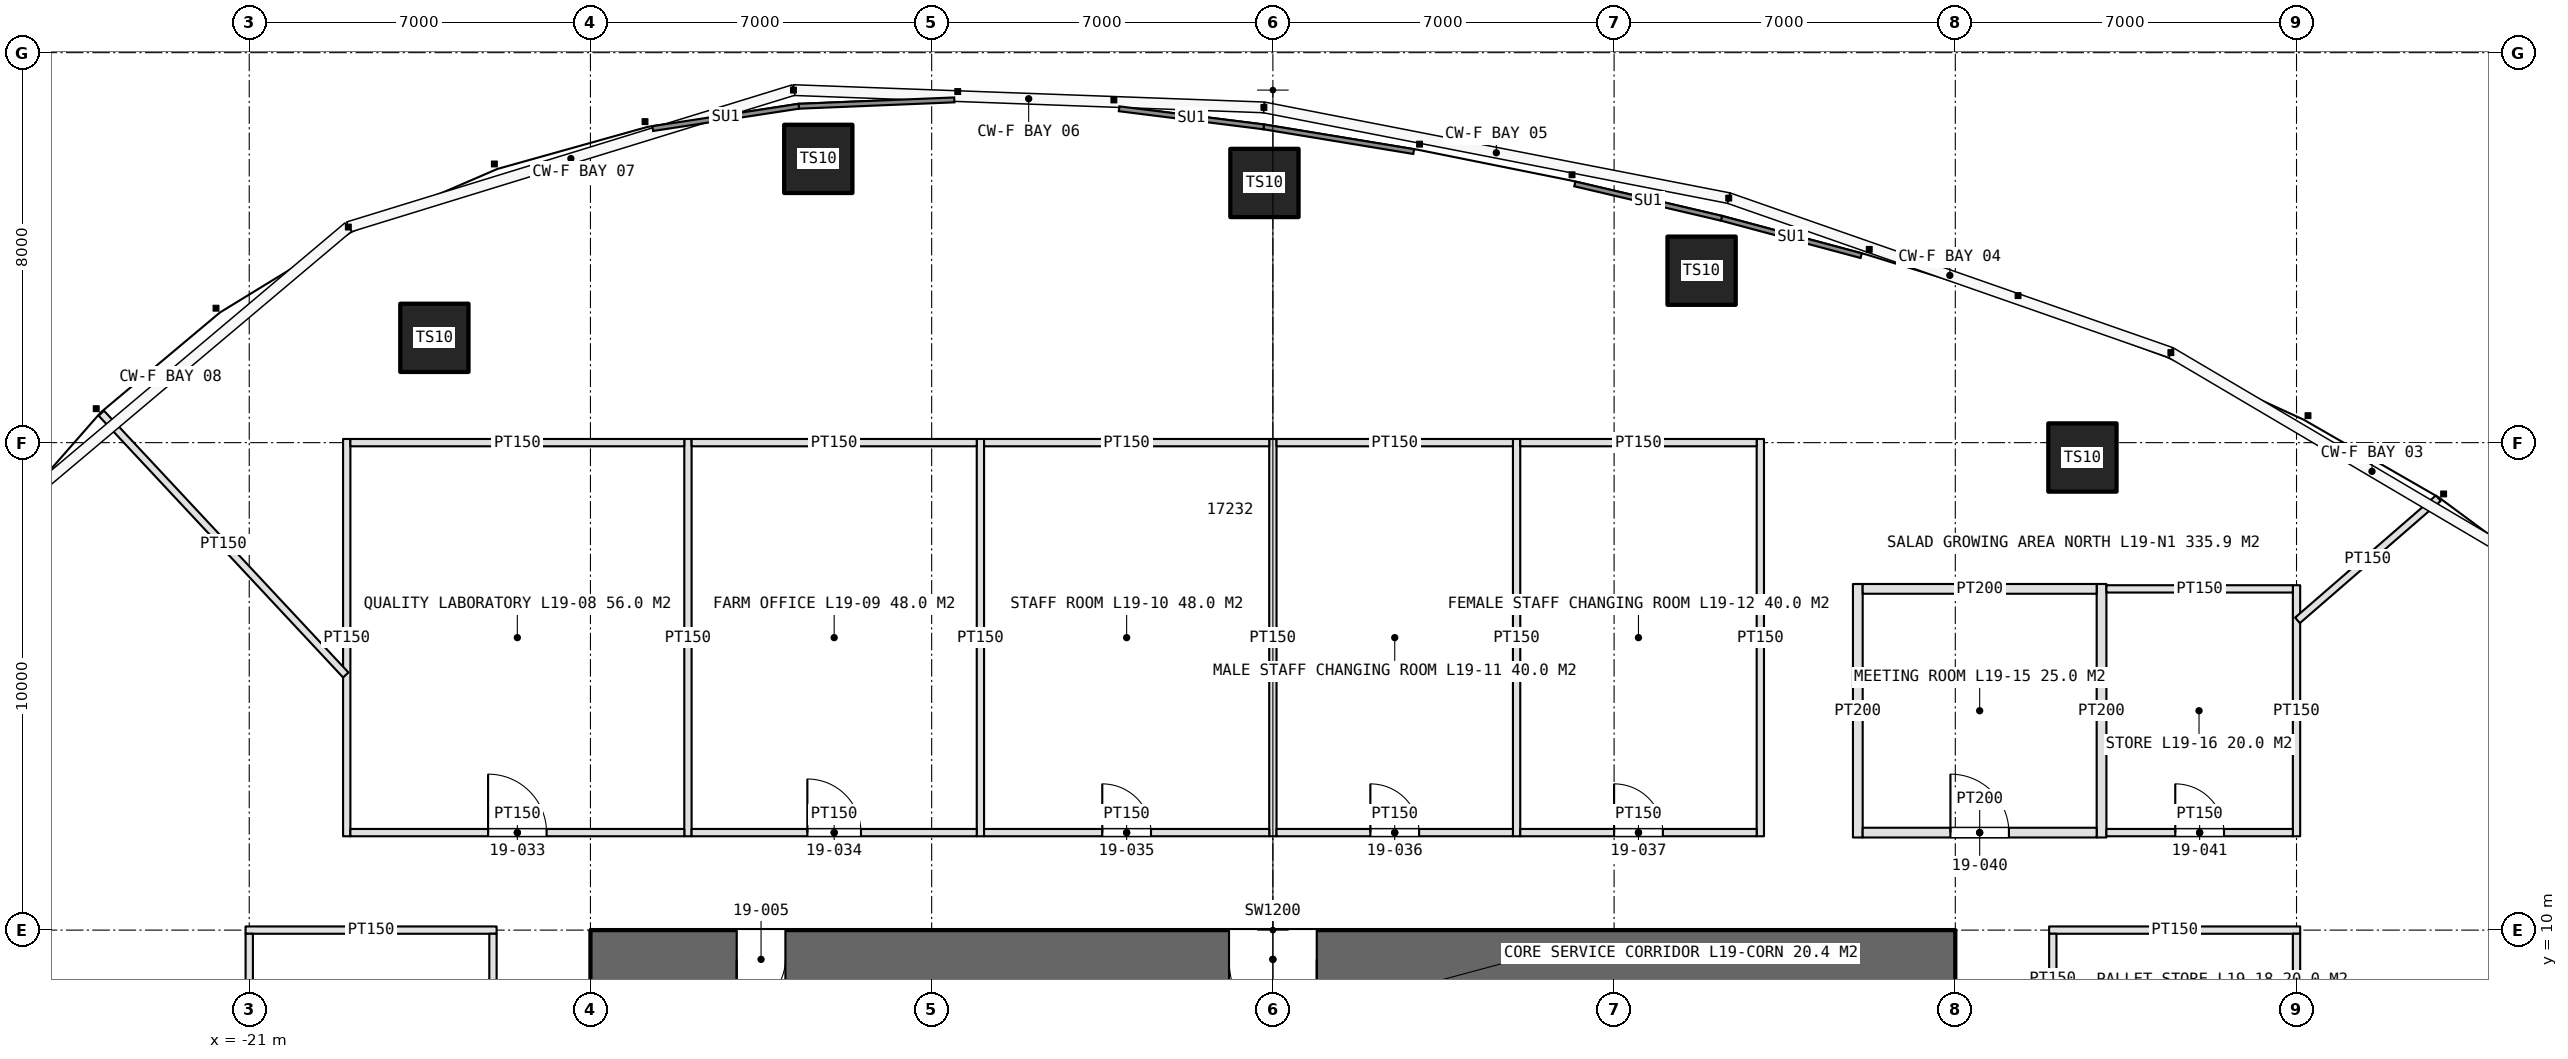
"""IFC4 building model, lengths in metres.
Left out: names, types, materials, properties, quantities, classifications, styles, units other than length and angle.
Written with IfcOpenShell. Run it as: python <this file> out.ifc"""

import sys

from ifc_helpers import new_model, si_unit, direction, frame, frame_2d, origin, origin_2d, place, context, subcontext, project, spatial, rectangle, hollow_rectangle, extrude, element, fill, save


model = new_model("IFC4")
c1 = context("Model", 3, precision=1e-05, world=origin(), true_north=direction((0.0, 1.0)))
c2 = subcontext(c1, "Body", "Model", "MODEL_VIEW")
j1 = project(units=[si_unit("LENGTHUNIT", "METRE"), si_unit("PLANEANGLEUNIT", "RADIAN")], contexts=[c1])
p1 = place(None, origin())
s1 = spatial("IfcSite", under=j1, at=p1, CompositionType="ELEMENT")
p2 = place(p1, origin())
s2 = spatial("IfcBuilding", under=s1, at=p2, CompositionType="ELEMENT")
p3 = place(p2, frame((0.0, 0.0, 95.0)))
s3 = spatial("IfcBuildingStorey", under=s2, at=p3, CompositionType="ELEMENT", Elevation=95.0)
p4 = place(p3, frame((14.0, 9.4, 0.0), z_axis=(0.0, 0.0, 1.0), x_axis=(-1.0, 0.0, 0.0)))
e1 = element("IfcWall", 1, at=p4, inside=s3, PredefinedType="SHEAR", context=c2, shape_type="SweptSolid", body=[
    extrude(rectangle(XDim=28.0, YDim=1.2, at=frame_2d((14.0, 0.0))), origin(), (0.0, 0.0, 1.0), 5.0),
])
p5 = place(p4, frame((24.0, 0.0, 0.0)))
e2 = element("IfcOpeningElement", 2, at=p5, cuts=e1, PredefinedType="OPENING", context=c2, shape_type="SweptSolid", body=[
    extrude(rectangle(XDim=1.0, YDim=2.4, at=frame_2d((0.5, 1.2))), frame((0.0, 0.61, 0.0), z_axis=(0.0, -1.0, 0.0), x_axis=(1.0, 0.0, 0.0)), (0.0, 0.0, 1.0), 1.22),
])
p6 = place(p4, frame((13.1, 0.0, 0.0)))
e3 = element("IfcOpeningElement", 3, at=p6, cuts=e1, PredefinedType="OPENING", context=c2, shape_type="SweptSolid", body=[
    extrude(rectangle(XDim=1.8, YDim=2.4, at=frame_2d((0.9, 1.2))), frame((0.0, 0.61, 0.0), z_axis=(0.0, -1.0, 0.0), x_axis=(1.0, 0.0, 0.0)), (0.0, 0.0, 1.0), 1.22),
])
p7 = place(p3, frame((16.608, 19.695, 0.0), z_axis=(0.0, 0.0, 1.0), x_axis=(1.0, 0.0, 0.0)))
e4 = element("IfcColumn", 4, at=p7, inside=s3, PredefinedType="COLUMN", context=c2, shape_type="SweptSolid", body=[
    extrude(hollow_rectangle(XDim=1.4, YDim=1.4, WallThickness=0.15, at=origin_2d()), origin(), (0.0, 0.0, 1.0), 5.0),
])
for number, where, z_axis, x_axis in (
    (5, (8.795, 23.527, 0.0), (0.0, 0.0, 1.0), (1.0, 0.0, 0.0)),
    (6, (-0.173, 25.327, 0.0), (0.0, 0.0, 1.0), (1.0, 0.0, 0.0)),
    (7, (-9.326, 25.821, 0.0), (0.0, 0.0, 1.0), (1.0, 0.0, 0.0)),
):
    element("IfcColumn", number, at=place(p3, frame(where, z_axis=z_axis, x_axis=x_axis)), inside=s3, PredefinedType="COLUMN", context=c2, shape_type="SweptSolid", body=[
        extrude(hollow_rectangle(XDim=1.4, YDim=1.4, WallThickness=0.15, at=origin_2d()), origin(), (0.0, 0.0, 1.0), 4.025),
    ])
p8 = place(p3, frame((-17.202, 22.15, 0.0), z_axis=(0.0, 0.0, 1.0), x_axis=(1.0, 0.0, 0.0)))
e8 = element("IfcColumn", 8, at=p8, inside=s3, PredefinedType="COLUMN", context=c2, shape_type="SweptSolid", body=[
    extrude(hollow_rectangle(XDim=1.4, YDim=1.4, WallThickness=0.15, at=origin_2d()), origin(), (0.0, 0.0, 1.0), 5.0),
])
for number, where, z_axis, x_axis in (
    (9, (-19.0, 11.925, 0.0), (0.0, 0.0, 1.0), (0.0, 1.0, 0.0)),
    (10, (-12.0, 11.925, 0.0), (0.0, 0.0, 1.0), (0.0, 1.0, 0.0)),
    (11, (-6.0, 11.925, 0.0), (0.0, 0.0, 1.0), (0.0, 1.0, 0.0)),
    (12, (0.0, 11.925, 0.0), (0.0, 0.0, 1.0), (0.0, 1.0, 0.0)),
    (13, (5.0, 11.925, 0.0), (0.0, 0.0, 1.0), (0.0, 1.0, 0.0)),
    (14, (10.0, 11.925, 0.0), (0.0, 0.0, 1.0), (0.0, 1.0, 0.0)),
):
    element("IfcWall", number, at=place(p3, frame(where, z_axis=z_axis, x_axis=x_axis)), inside=s3, PredefinedType="PARTITIONING", context=c2, shape_type="SweptSolid", body=[
        extrude(rectangle(XDim=8.15, YDim=0.15, at=frame_2d((4.075, 0.0))), origin(), (0.0, 0.0, 1.0), 3.6),
    ])
p9 = place(p3, frame((-18.925, 12.0, 0.0), z_axis=(0.0, 0.0, 1.0), x_axis=(1.0, 0.0, 0.0)))
e15 = element("IfcWall", 15, at=p9, inside=s3, PredefinedType="PARTITIONING", context=c2, shape_type="SweptSolid", body=[
    extrude(rectangle(XDim=6.85, YDim=0.15, at=frame_2d((3.425, 0.0))), origin(), (0.0, 0.0, 1.0), 3.6),
])
p10 = place(p9, frame((2.825, 0.0, 0.0)))
e16 = element("IfcOpeningElement", 16, at=p10, cuts=e15, PredefinedType="OPENING", context=c2, shape_type="SweptSolid", body=[
    extrude(rectangle(XDim=1.2, YDim=2.3, at=frame_2d((0.6, 1.15))), frame((0.0, 0.085, 0.0), z_axis=(0.0, -1.0, 0.0), x_axis=(1.0, 0.0, 0.0)), (0.0, 0.0, 1.0), 0.17),
])
p11 = place(p3, frame((-18.925, 20.0, 0.0), z_axis=(0.0, 0.0, 1.0), x_axis=(1.0, 0.0, 0.0)))
e17 = element("IfcWall", 17, at=p11, inside=s3, PredefinedType="PARTITIONING", context=c2, shape_type="SweptSolid", body=[
    extrude(rectangle(XDim=6.85, YDim=0.15, at=frame_2d((3.425, 0.0))), origin(), (0.0, 0.0, 1.0), 3.6),
])
p12 = place(p3, frame((-11.925, 12.0, 0.0), z_axis=(0.0, 0.0, 1.0), x_axis=(1.0, 0.0, 0.0)))
e18 = element("IfcWall", 18, at=p12, inside=s3, PredefinedType="PARTITIONING", context=c2, shape_type="SweptSolid", body=[
    extrude(rectangle(XDim=5.85, YDim=0.15, at=frame_2d((2.925, 0.0))), origin(), (0.0, 0.0, 1.0), 3.6),
])
p13 = place(p12, frame((2.375, 0.0, 0.0)))
e19 = element("IfcOpeningElement", 19, at=p13, cuts=e18, PredefinedType="OPENING", context=c2, shape_type="SweptSolid", body=[
    extrude(rectangle(XDim=1.1, YDim=2.3, at=frame_2d((0.55, 1.15))), frame((0.0, 0.085, 0.0), z_axis=(0.0, -1.0, 0.0), x_axis=(1.0, 0.0, 0.0)), (0.0, 0.0, 1.0), 0.17),
])
p14 = place(p3, frame((-11.925, 20.0, 0.0), z_axis=(0.0, 0.0, 1.0), x_axis=(1.0, 0.0, 0.0)))
e20 = element("IfcWall", 20, at=p14, inside=s3, PredefinedType="PARTITIONING", context=c2, shape_type="SweptSolid", body=[
    extrude(rectangle(XDim=5.85, YDim=0.15, at=frame_2d((2.925, 0.0))), origin(), (0.0, 0.0, 1.0), 3.6),
])
p15 = place(p3, frame((-5.925, 12.0, 0.0), z_axis=(0.0, 0.0, 1.0), x_axis=(1.0, 0.0, 0.0)))
e21 = element("IfcWall", 21, at=p15, inside=s3, PredefinedType="PARTITIONING", context=c2, shape_type="SweptSolid", body=[
    extrude(rectangle(XDim=5.85, YDim=0.15, at=frame_2d((2.925, 0.0))), origin(), (0.0, 0.0, 1.0), 3.6),
])
p16 = place(p15, frame((2.425, 0.0, 0.0)))
e22 = element("IfcOpeningElement", 22, at=p16, cuts=e21, PredefinedType="OPENING", context=c2, shape_type="SweptSolid", body=[
    extrude(rectangle(XDim=1.0, YDim=2.2, at=frame_2d((0.5, 1.1))), frame((0.0, 0.085, 0.0), z_axis=(0.0, -1.0, 0.0), x_axis=(1.0, 0.0, 0.0)), (0.0, 0.0, 1.0), 0.17),
])
p17 = place(p3, frame((-5.925, 20.0, 0.0), z_axis=(0.0, 0.0, 1.0), x_axis=(1.0, 0.0, 0.0)))
e23 = element("IfcWall", 23, at=p17, inside=s3, PredefinedType="PARTITIONING", context=c2, shape_type="SweptSolid", body=[
    extrude(rectangle(XDim=5.85, YDim=0.15, at=frame_2d((2.925, 0.0))), origin(), (0.0, 0.0, 1.0), 3.6),
])
p18 = place(p3, frame((0.075, 12.0, 0.0), z_axis=(0.0, 0.0, 1.0), x_axis=(1.0, 0.0, 0.0)))
e24 = element("IfcWall", 24, at=p18, inside=s3, PredefinedType="PARTITIONING", context=c2, shape_type="SweptSolid", body=[
    extrude(rectangle(XDim=4.85, YDim=0.15, at=frame_2d((2.425, 0.0))), origin(), (0.0, 0.0, 1.0), 3.6),
])
p19 = place(p18, frame((1.925, 0.0, 0.0)))
e25 = element("IfcOpeningElement", 25, at=p19, cuts=e24, PredefinedType="OPENING", context=c2, shape_type="SweptSolid", body=[
    extrude(rectangle(XDim=1.0, YDim=2.2, at=frame_2d((0.5, 1.1))), frame((0.0, 0.085, 0.0), z_axis=(0.0, -1.0, 0.0), x_axis=(1.0, 0.0, 0.0)), (0.0, 0.0, 1.0), 0.17),
])
p20 = place(p3, frame((0.075, 20.0, 0.0), z_axis=(0.0, 0.0, 1.0), x_axis=(1.0, 0.0, 0.0)))
e26 = element("IfcWall", 26, at=p20, inside=s3, PredefinedType="PARTITIONING", context=c2, shape_type="SweptSolid", body=[
    extrude(rectangle(XDim=4.85, YDim=0.15, at=frame_2d((2.425, 0.0))), origin(), (0.0, 0.0, 1.0), 3.6),
])
p21 = place(p3, frame((5.075, 12.0, 0.0), z_axis=(0.0, 0.0, 1.0), x_axis=(1.0, 0.0, 0.0)))
e27 = element("IfcWall", 27, at=p21, inside=s3, PredefinedType="PARTITIONING", context=c2, shape_type="SweptSolid", body=[
    extrude(rectangle(XDim=4.85, YDim=0.15, at=frame_2d((2.425, 0.0))), origin(), (0.0, 0.0, 1.0), 3.6),
])
p22 = place(p21, frame((1.925, 0.0, 0.0)))
e28 = element("IfcOpeningElement", 28, at=p22, cuts=e27, PredefinedType="OPENING", context=c2, shape_type="SweptSolid", body=[
    extrude(rectangle(XDim=1.0, YDim=2.2, at=frame_2d((0.5, 1.1))), frame((0.0, 0.085, 0.0), z_axis=(0.0, -1.0, 0.0), x_axis=(1.0, 0.0, 0.0)), (0.0, 0.0, 1.0), 0.17),
])
p23 = place(p3, frame((5.075, 20.0, 0.0), z_axis=(0.0, 0.0, 1.0), x_axis=(1.0, 0.0, 0.0)))
e29 = element("IfcWall", 29, at=p23, inside=s3, PredefinedType="PARTITIONING", context=c2, shape_type="SweptSolid", body=[
    extrude(rectangle(XDim=4.85, YDim=0.15, at=frame_2d((2.425, 0.0))), origin(), (0.0, 0.0, 1.0), 3.6),
])
for number, where, z_axis, x_axis in (
    (30, (12.0, 11.9, 0.0), (0.0, 0.0, 1.0), (0.0, 1.0, 0.0)),
    (31, (17.0, 11.9, 0.0), (0.0, 0.0, 1.0), (0.0, 1.0, 0.0)),
):
    element("IfcWall", number, at=place(p3, frame(where, z_axis=z_axis, x_axis=x_axis)), inside=s3, PredefinedType="PARTITIONING", context=c2, shape_type="SweptSolid", body=[
        extrude(rectangle(XDim=5.2, YDim=0.2, at=frame_2d((2.6, 0.0))), origin(), (0.0, 0.0, 1.0), 3.6),
    ])
p24 = place(p3, frame((21.0, 11.925, 0.0), z_axis=(0.0, 0.0, 1.0), x_axis=(0.0, 1.0, 0.0)))
e32 = element("IfcWall", 32, at=p24, inside=s3, PredefinedType="PARTITIONING", context=c2, shape_type="SweptSolid", body=[
    extrude(rectangle(XDim=5.15, YDim=0.15, at=frame_2d((2.575, 0.0))), origin(), (0.0, 0.0, 1.0), 3.6),
])
p25 = place(p3, frame((12.1, 12.0, 0.0), z_axis=(0.0, 0.0, 1.0), x_axis=(1.0, 0.0, 0.0)))
e33 = element("IfcWall", 33, at=p25, inside=s3, PredefinedType="PARTITIONING", context=c2, shape_type="SweptSolid", body=[
    extrude(rectangle(XDim=4.8, YDim=0.2, at=frame_2d((2.4, 0.0))), origin(), (0.0, 0.0, 1.0), 3.6),
])
p26 = place(p25, frame((1.8, 0.0, 0.0)))
e34 = element("IfcOpeningElement", 34, at=p26, cuts=e33, PredefinedType="OPENING", context=c2, shape_type="SweptSolid", body=[
    extrude(rectangle(XDim=1.2, YDim=2.4, at=frame_2d((0.6, 1.2))), frame((0.0, 0.11, 0.0), z_axis=(0.0, -1.0, 0.0), x_axis=(1.0, 0.0, 0.0)), (0.0, 0.0, 1.0), 0.22),
])
p27 = place(p3, frame((12.1, 17.0, 0.0), z_axis=(0.0, 0.0, 1.0), x_axis=(1.0, 0.0, 0.0)))
e35 = element("IfcWall", 35, at=p27, inside=s3, PredefinedType="PARTITIONING", context=c2, shape_type="SweptSolid", body=[
    extrude(rectangle(XDim=4.8, YDim=0.2, at=frame_2d((2.4, 0.0))), origin(), (0.0, 0.0, 1.0), 3.6),
])
p28 = place(p3, frame((17.1, 12.0, 0.0), z_axis=(0.0, 0.0, 1.0), x_axis=(1.0, 0.0, 0.0)))
e36 = element("IfcWall", 36, at=p28, inside=s3, PredefinedType="PARTITIONING", context=c2, shape_type="SweptSolid", body=[
    extrude(rectangle(XDim=3.825, YDim=0.15, at=frame_2d((1.913, 0.0))), origin(), (0.0, 0.0, 1.0), 3.6),
])
p29 = place(p28, frame((1.413, 0.0, 0.0)))
e37 = element("IfcOpeningElement", 37, at=p29, cuts=e36, PredefinedType="OPENING", context=c2, shape_type="SweptSolid", body=[
    extrude(rectangle(XDim=1.0, YDim=2.2, at=frame_2d((0.5, 1.1))), frame((0.0, 0.085, 0.0), z_axis=(0.0, -1.0, 0.0), x_axis=(1.0, 0.0, 0.0)), (0.0, 0.0, 1.0), 0.17),
])
p30 = place(p3, frame((17.1, 17.0, 0.0), z_axis=(0.0, 0.0, 1.0), x_axis=(1.0, 0.0, 0.0)))
e38 = element("IfcWall", 38, at=p30, inside=s3, PredefinedType="PARTITIONING", context=c2, shape_type="SweptSolid", body=[
    extrude(rectangle(XDim=3.825, YDim=0.15, at=frame_2d((1.913, 0.0))), origin(), (0.0, 0.0, 1.0), 3.6),
])
p31 = place(p3, frame((15.925, 10.0, 0.0), z_axis=(0.0, 0.0, 1.0), x_axis=(1.0, 0.0, 0.0)))
e39 = element("IfcWall", 39, at=p31, inside=s3, PredefinedType="PARTITIONING", context=c2, shape_type="SweptSolid", body=[
    extrude(rectangle(XDim=5.15, YDim=0.15, at=frame_2d((2.575, 0.0))), origin(), (0.0, 0.0, 1.0), 3.6),
])
p32 = place(p3, frame((16.0, 6.075, 0.0), z_axis=(0.0, 0.0, 1.0), x_axis=(0.0, 1.0, 0.0)))
e40 = element("IfcWall", 40, at=p32, inside=s3, PredefinedType="PARTITIONING", context=c2, shape_type="SweptSolid", body=[
    extrude(rectangle(XDim=3.85, YDim=0.15, at=frame_2d((1.925, 0.0))), origin(), (0.0, 0.0, 1.0), 3.6),
])
p33 = place(p32, frame((1.225, 0.0, 0.0)))
e41 = element("IfcOpeningElement", 41, at=p33, cuts=e40, PredefinedType="OPENING", context=c2, shape_type="SweptSolid", body=[
    extrude(rectangle(XDim=1.4, YDim=2.4, at=frame_2d((0.7, 1.2))), frame((0.0, 0.085, 0.0), z_axis=(0.0, -1.0, 0.0), x_axis=(1.0, 0.0, 0.0)), (0.0, 0.0, 1.0), 0.17),
])
p34 = place(p3, frame((21.0, 6.075, 0.0), z_axis=(0.0, 0.0, 1.0), x_axis=(0.0, 1.0, 0.0)))
e42 = element("IfcWall", 42, at=p34, inside=s3, PredefinedType="PARTITIONING", context=c2, shape_type="SweptSolid", body=[
    extrude(rectangle(XDim=3.85, YDim=0.15, at=frame_2d((1.925, 0.0))), origin(), (0.0, 0.0, 1.0), 3.6),
])
p35 = place(p3, frame((-15.925, 10.0, 0.0), z_axis=(0.0, 0.0, 1.0), x_axis=(-1.0, 0.0, 0.0)))
e43 = element("IfcWall", 43, at=p35, inside=s3, PredefinedType="PARTITIONING", context=c2, shape_type="SweptSolid", body=[
    extrude(rectangle(XDim=5.15, YDim=0.15, at=frame_2d((2.575, 0.0))), origin(), (0.0, 0.0, 1.0), 3.6),
])
p36 = place(p3, frame((-16.0, 5.075, 0.0), z_axis=(0.0, 0.0, 1.0), x_axis=(0.0, 1.0, 0.0)))
e44 = element("IfcWall", 44, at=p36, inside=s3, PredefinedType="PARTITIONING", context=c2, shape_type="SweptSolid", body=[
    extrude(rectangle(XDim=4.85, YDim=0.15, at=frame_2d((2.425, 0.0))), origin(), (0.0, 0.0, 1.0), 3.6),
])
p37 = place(p36, frame((1.925, 0.0, 0.0)))
e45 = element("IfcOpeningElement", 45, at=p37, cuts=e44, PredefinedType="OPENING", context=c2, shape_type="SweptSolid", body=[
    extrude(rectangle(XDim=1.0, YDim=2.2, at=frame_2d((0.5, 1.1))), frame((0.0, 0.085, 0.0), z_axis=(0.0, -1.0, 0.0), x_axis=(1.0, 0.0, 0.0)), (0.0, 0.0, 1.0), 0.17),
])
p38 = place(p3, frame((-21.0, 5.075, 0.0), z_axis=(0.0, 0.0, 1.0), x_axis=(0.0, 1.0, 0.0)))
e46 = element("IfcWall", 46, at=p38, inside=s3, PredefinedType="PARTITIONING", context=c2, shape_type="SweptSolid", body=[
    extrude(rectangle(XDim=4.85, YDim=0.15, at=frame_2d((2.425, 0.0))), origin(), (0.0, 0.0, 1.0), 3.6),
])
p39 = place(p3, frame((-19.02, 15.234, 0.0), z_axis=(0.0, 0.0, 1.0), x_axis=(-0.682519491562, 0.730867391281, 0.0)))
e47 = element("IfcWall", 47, at=p39, inside=s3, PredefinedType="PARTITIONING", context=c2, shape_type="SweptSolid", body=[
    extrude(rectangle(XDim=7.347, YDim=0.15, at=frame_2d((3.674, 0.0))), origin(), (0.0, 0.0, 1.0), 3.6),
])
p40 = place(p3, frame((21.02, 16.354, 0.0), z_axis=(0.0, 0.0, 1.0), x_axis=(0.755425653008, 0.655234372402, 0.0)))
e48 = element("IfcWall", 48, at=p40, inside=s3, PredefinedType="PARTITIONING", context=c2, shape_type="SweptSolid", body=[
    extrude(rectangle(XDim=3.823, YDim=0.15, at=frame_2d((1.912, 0.0))), origin(), (0.0, 0.0, 1.0), 3.6),
])
p41 = place(p5, origin())
e49 = element("IfcDoor", 49, at=p41, inside=s3, OperationType="SINGLE_SWING_RIGHT", PredefinedType="DOOR", context=c2, shape_type="SweptSolid", body=[
    extrude(rectangle(XDim=1.0, YDim=2.4, at=frame_2d((0.5, 1.2))), frame((0.0, 0.025, 0.0), z_axis=(0.0, -1.0, 0.0), x_axis=(1.0, 0.0, 0.0)), (0.0, 0.0, 1.0), 0.05),
])
fill(e2, e49)
p42 = place(p6, origin())
e50 = element("IfcDoor", 50, at=p42, inside=s3, OperationType="DOUBLE_DOOR_SINGLE_SWING", PredefinedType="DOOR", context=c2, shape_type="SweptSolid", body=[
    extrude(rectangle(XDim=1.8, YDim=2.4, at=frame_2d((0.9, 1.2))), frame((0.0, 0.025, 0.0), z_axis=(0.0, -1.0, 0.0), x_axis=(1.0, 0.0, 0.0)), (0.0, 0.0, 1.0), 0.05),
])
fill(e3, e50)
p43 = place(p10, origin())
e51 = element("IfcDoor", 51, at=p43, inside=s3, OperationType="SINGLE_SWING_LEFT", PredefinedType="DOOR", context=c2, shape_type="SweptSolid", body=[
    extrude(rectangle(XDim=1.2, YDim=2.3, at=frame_2d((0.6, 1.15))), frame((0.0, 0.025, 0.0), z_axis=(0.0, -1.0, 0.0), x_axis=(1.0, 0.0, 0.0)), (0.0, 0.0, 1.0), 0.05),
])
fill(e16, e51)
p44 = place(p13, origin())
e52 = element("IfcDoor", 52, at=p44, inside=s3, OperationType="SINGLE_SWING_LEFT", PredefinedType="DOOR", context=c2, shape_type="SweptSolid", body=[
    extrude(rectangle(XDim=1.1, YDim=2.3, at=frame_2d((0.55, 1.15))), frame((0.0, 0.025, 0.0), z_axis=(0.0, -1.0, 0.0), x_axis=(1.0, 0.0, 0.0)), (0.0, 0.0, 1.0), 0.05),
])
fill(e19, e52)
p45 = place(p16, origin())
e53 = element("IfcDoor", 53, at=p45, inside=s3, OperationType="SINGLE_SWING_LEFT", PredefinedType="DOOR", context=c2, shape_type="SweptSolid", body=[
    extrude(rectangle(XDim=1.0, YDim=2.2, at=frame_2d((0.5, 1.1))), frame((0.0, 0.025, 0.0), z_axis=(0.0, -1.0, 0.0), x_axis=(1.0, 0.0, 0.0)), (0.0, 0.0, 1.0), 0.05),
])
fill(e22, e53)
p46 = place(p19, origin())
e54 = element("IfcDoor", 54, at=p46, inside=s3, OperationType="SINGLE_SWING_LEFT", PredefinedType="DOOR", context=c2, shape_type="SweptSolid", body=[
    extrude(rectangle(XDim=1.0, YDim=2.2, at=frame_2d((0.5, 1.1))), frame((0.0, 0.025, 0.0), z_axis=(0.0, -1.0, 0.0), x_axis=(1.0, 0.0, 0.0)), (0.0, 0.0, 1.0), 0.05),
])
fill(e25, e54)
p47 = place(p22, origin())
e55 = element("IfcDoor", 55, at=p47, inside=s3, OperationType="SINGLE_SWING_LEFT", PredefinedType="DOOR", context=c2, shape_type="SweptSolid", body=[
    extrude(rectangle(XDim=1.0, YDim=2.2, at=frame_2d((0.5, 1.1))), frame((0.0, 0.025, 0.0), z_axis=(0.0, -1.0, 0.0), x_axis=(1.0, 0.0, 0.0)), (0.0, 0.0, 1.0), 0.05),
])
fill(e28, e55)
p48 = place(p26, origin())
e56 = element("IfcDoor", 56, at=p48, inside=s3, OperationType="SINGLE_SWING_LEFT", PredefinedType="DOOR", context=c2, shape_type="SweptSolid", body=[
    extrude(rectangle(XDim=1.2, YDim=2.4, at=frame_2d((0.6, 1.2))), frame((0.0, 0.025, 0.0), z_axis=(0.0, -1.0, 0.0), x_axis=(1.0, 0.0, 0.0)), (0.0, 0.0, 1.0), 0.05),
])
fill(e34, e56)
p49 = place(p29, origin())
e57 = element("IfcDoor", 57, at=p49, inside=s3, OperationType="SINGLE_SWING_LEFT", PredefinedType="DOOR", context=c2, shape_type="SweptSolid", body=[
    extrude(rectangle(XDim=1.0, YDim=2.2, at=frame_2d((0.5, 1.1))), frame((0.0, 0.025, 0.0), z_axis=(0.0, -1.0, 0.0), x_axis=(1.0, 0.0, 0.0)), (0.0, 0.0, 1.0), 0.05),
])
fill(e37, e57)
save(model, sys.argv[1])
